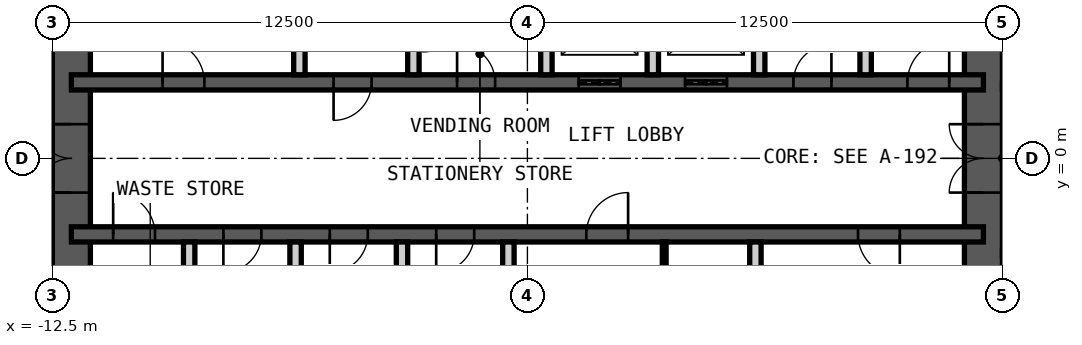
"""IFC4 building model, lengths in metres.
Left out: names, types, materials, properties, quantities, classifications, styles, units other than length and angle.
Written with IfcOpenShell. Run it as: python <this file> out.ifc"""

import sys

from ifc_helpers import new_model, si_unit, direction, frame, frame_2d, origin, place, context, subcontext, project, spatial, rectangle, extrude, element, fill, save


model = new_model("IFC4")
c1 = context("Model", 3, precision=1e-05, world=origin(), true_north=direction((0.0, 1.0)))
c2 = subcontext(c1, "Body", "Model", "MODEL_VIEW")
j1 = project(units=[si_unit("LENGTHUNIT", "METRE"), si_unit("PLANEANGLEUNIT", "RADIAN")], contexts=[c1])
p1 = place(None, origin())
s1 = spatial("IfcSite", under=j1, at=p1, CompositionType="ELEMENT")
p2 = place(p1, origin())
s2 = spatial("IfcBuilding", under=s1, at=p2, CompositionType="ELEMENT")
p3 = place(p2, frame((0.0, 0.0, 295.6)))
s3 = spatial("IfcBuildingStorey", under=s2, at=p3, CompositionType="ELEMENT", Elevation=295.6)
p4 = place(p3, frame((12.0, -9.0, 0.0), z_axis=(0.0, 0.0, 1.0), x_axis=(0.0, 1.0, 0.0)))
e1 = element("IfcWall", 1, at=p4, inside=s3, PredefinedType="SHEAR", context=c2, shape_type="SweptSolid", body=[
    extrude(rectangle(XDim=18.0, YDim=1.0, at=frame_2d((9.0, 0.0))), origin(), (0.0, 0.0, 1.0), 4.2),
])
p5 = place(p4, frame((8.1, 0.0, 0.0)))
e2 = element("IfcOpeningElement", 2, at=p5, cuts=e1, PredefinedType="OPENING", context=c2, shape_type="SweptSolid", body=[
    extrude(rectangle(XDim=1.8, YDim=2.1, at=frame_2d((0.9, 1.05))), frame((0.0, 0.51, 0.0), z_axis=(0.0, -1.0, 0.0), x_axis=(1.0, 0.0, 0.0)), (0.0, 0.0, 1.0), 1.02),
])
p6 = place(p3, frame((-12.0, -9.0, 0.0), z_axis=(0.0, 0.0, 1.0), x_axis=(0.0, 1.0, 0.0)))
e3 = element("IfcWall", 3, at=p6, inside=s3, PredefinedType="SHEAR", context=c2, shape_type="SweptSolid", body=[
    extrude(rectangle(XDim=18.0, YDim=1.0, at=frame_2d((9.0, 0.0))), origin(), (0.0, 0.0, 1.0), 4.2),
])
p7 = place(p6, frame((8.1, 0.0, 0.0)))
e4 = element("IfcOpeningElement", 4, at=p7, cuts=e3, PredefinedType="OPENING", context=c2, shape_type="SweptSolid", body=[
    extrude(rectangle(XDim=1.8, YDim=2.1, at=frame_2d((0.9, 1.05))), frame((0.0, 0.51, 0.0), z_axis=(0.0, -1.0, 0.0), x_axis=(1.0, 0.0, 0.0)), (0.0, 0.0, 1.0), 1.02),
])
p8 = place(p3, frame((-12.0, 2.0, 0.0), z_axis=(0.0, 0.0, 1.0), x_axis=(1.0, 0.0, 0.0)))
e5 = element("IfcWall", 5, at=p8, inside=s3, PredefinedType="SHEAR", context=c2, shape_type="SweptSolid", body=[
    extrude(rectangle(XDim=24.0, YDim=0.4, at=frame_2d((12.0, 0.0))), origin(), (0.0, 0.0, 1.0), 4.2),
])
p9 = place(p8, frame((2.4, 0.0, 0.0)))
e6 = element("IfcOpeningElement", 6, at=p9, cuts=e5, PredefinedType="OPENING", context=c2, shape_type="SweptSolid", body=[
    extrude(rectangle(XDim=1.1, YDim=2.1, at=frame_2d((0.55, 1.05))), frame((0.0, 0.21, 0.0), z_axis=(0.0, -1.0, 0.0), x_axis=(1.0, 0.0, 0.0)), (0.0, 0.0, 1.0), 0.42),
])
p10 = place(p8, frame((22.0, 0.0, 0.0)))
e7 = element("IfcOpeningElement", 7, at=p10, cuts=e5, PredefinedType="OPENING", context=c2, shape_type="SweptSolid", body=[
    extrude(rectangle(XDim=1.1, YDim=2.1, at=frame_2d((0.55, 1.05))), frame((0.0, 0.21, 0.0), z_axis=(0.0, -1.0, 0.0), x_axis=(1.0, 0.0, 0.0)), (0.0, 0.0, 1.0), 0.42),
])
p11 = place(p8, frame((10.15, 0.0, 0.0)))
e8 = element("IfcOpeningElement", 8, at=p11, cuts=e5, PredefinedType="OPENING", context=c2, shape_type="SweptSolid", body=[
    extrude(rectangle(XDim=1.0, YDim=2.1, at=frame_2d((0.5, 1.05))), frame((0.0, 0.21, 0.0), z_axis=(0.0, -1.0, 0.0), x_axis=(1.0, 0.0, 0.0)), (0.0, 0.0, 1.0), 0.42),
])
p12 = place(p8, frame((6.9, 0.0, 0.0)))
e9 = element("IfcOpeningElement", 9, at=p12, cuts=e5, PredefinedType="OPENING", context=c2, shape_type="SweptSolid", body=[
    extrude(rectangle(XDim=1.0, YDim=2.1, at=frame_2d((0.5, 1.05))), frame((0.0, 0.21, 0.0), z_axis=(0.0, -1.0, 0.0), x_axis=(1.0, 0.0, 0.0)), (0.0, 0.0, 1.0), 0.42),
])
p13 = place(p8, frame((13.35, 0.0, 0.0)))
e10 = element("IfcOpeningElement", 10, at=p13, cuts=e5, PredefinedType="OPENING", context=c2, shape_type="SweptSolid", body=[
    extrude(rectangle(XDim=1.1, YDim=2.4, at=frame_2d((0.55, 1.2))), frame((0.0, 0.21, 0.0), z_axis=(0.0, -1.0, 0.0), x_axis=(1.0, 0.0, 0.0)), (0.0, 0.0, 1.0), 0.42),
])
p14 = place(p8, frame((16.15, 0.0, 0.0)))
e11 = element("IfcOpeningElement", 11, at=p14, cuts=e5, PredefinedType="OPENING", context=c2, shape_type="SweptSolid", body=[
    extrude(rectangle(XDim=1.1, YDim=2.4, at=frame_2d((0.55, 1.2))), frame((0.0, 0.21, 0.0), z_axis=(0.0, -1.0, 0.0), x_axis=(1.0, 0.0, 0.0)), (0.0, 0.0, 1.0), 0.42),
])
p15 = place(p8, frame((19.0, 0.0, 0.0)))
e12 = element("IfcOpeningElement", 12, at=p15, cuts=e5, PredefinedType="OPENING", context=c2, shape_type="SweptSolid", body=[
    extrude(rectangle(XDim=1.0, YDim=2.1, at=frame_2d((0.5, 1.05))), frame((0.0, 0.21, 0.0), z_axis=(0.0, -1.0, 0.0), x_axis=(1.0, 0.0, 0.0)), (0.0, 0.0, 1.0), 0.42),
])
p16 = place(p3, frame((-12.0, -2.0, 0.0), z_axis=(0.0, 0.0, 1.0), x_axis=(1.0, 0.0, 0.0)))
e13 = element("IfcWall", 13, at=p16, inside=s3, PredefinedType="SHEAR", context=c2, shape_type="SweptSolid", body=[
    extrude(rectangle(XDim=24.0, YDim=0.4, at=frame_2d((12.0, 0.0))), origin(), (0.0, 0.0, 1.0), 4.2),
])
p17 = place(p16, frame((1.1, 0.0, 0.0)))
e14 = element("IfcOpeningElement", 14, at=p17, cuts=e13, PredefinedType="OPENING", context=c2, shape_type="SweptSolid", body=[
    extrude(rectangle(XDim=1.1, YDim=2.1, at=frame_2d((0.55, 1.05))), frame((0.0, 0.21, 0.0), z_axis=(0.0, -1.0, 0.0), x_axis=(1.0, 0.0, 0.0)), (0.0, 0.0, 1.0), 0.42),
])
p18 = place(p16, frame((13.55, 0.0, 0.0)))
e15 = element("IfcOpeningElement", 15, at=p18, cuts=e13, PredefinedType="OPENING", context=c2, shape_type="SweptSolid", body=[
    extrude(rectangle(XDim=1.1, YDim=2.1, at=frame_2d((0.55, 1.05))), frame((0.0, 0.21, 0.0), z_axis=(0.0, -1.0, 0.0), x_axis=(1.0, 0.0, 0.0)), (0.0, 0.0, 1.0), 0.42),
])
p19 = place(p16, frame((20.7, 0.0, 0.0)))
e16 = element("IfcOpeningElement", 16, at=p19, cuts=e13, PredefinedType="OPENING", context=c2, shape_type="SweptSolid", body=[
    extrude(rectangle(XDim=1.1, YDim=2.1, at=frame_2d((0.55, 1.05))), frame((0.0, 0.21, 0.0), z_axis=(0.0, -1.0, 0.0), x_axis=(1.0, 0.0, 0.0)), (0.0, 0.0, 1.0), 0.42),
])
p20 = place(p16, frame((4.0, 0.0, 0.0)))
e17 = element("IfcOpeningElement", 17, at=p20, cuts=e13, PredefinedType="OPENING", context=c2, shape_type="SweptSolid", body=[
    extrude(rectangle(XDim=1.0, YDim=2.1, at=frame_2d((0.5, 1.05))), frame((0.0, 0.21, 0.0), z_axis=(0.0, -1.0, 0.0), x_axis=(1.0, 0.0, 0.0)), (0.0, 0.0, 1.0), 0.42),
])
p21 = place(p16, frame((6.8, 0.0, 0.0)))
e18 = element("IfcOpeningElement", 18, at=p21, cuts=e13, PredefinedType="OPENING", context=c2, shape_type="SweptSolid", body=[
    extrude(rectangle(XDim=1.0, YDim=2.1, at=frame_2d((0.5, 1.05))), frame((0.0, 0.21, 0.0), z_axis=(0.0, -1.0, 0.0), x_axis=(1.0, 0.0, 0.0)), (0.0, 0.0, 1.0), 0.42),
])
p22 = place(p16, frame((9.6, 0.0, 0.0)))
e19 = element("IfcOpeningElement", 19, at=p22, cuts=e13, PredefinedType="OPENING", context=c2, shape_type="SweptSolid", body=[
    extrude(rectangle(XDim=1.0, YDim=2.1, at=frame_2d((0.5, 1.05))), frame((0.0, 0.21, 0.0), z_axis=(0.0, -1.0, 0.0), x_axis=(1.0, 0.0, 0.0)), (0.0, 0.0, 1.0), 0.42),
])
for number, where, z_axis, x_axis in (
    (20, (-6.0, 2.2, 0.0), (0.0, 0.0, 1.0), (0.0, 1.0, 0.0)),
    (21, (-3.0, 2.2, 0.0), (0.0, 0.0, 1.0), (0.0, 1.0, 0.0)),
    (22, (0.5, 2.2, 0.0), (0.0, 0.0, 1.0), (0.0, 1.0, 0.0)),
    (23, (3.3, 2.2, 0.0), (0.0, 0.0, 1.0), (0.0, 1.0, 0.0)),
    (24, (6.1, 2.2, 0.0), (0.0, 0.0, 1.0), (0.0, 1.0, 0.0)),
    (25, (8.9, 2.2, 0.0), (0.0, 0.0, 1.0), (0.0, 1.0, 0.0)),
    (26, (-8.9, -4.85, 0.0), (0.0, 0.0, 1.0), (0.0, 1.0, 0.0)),
    (27, (-6.1, -4.85, 0.0), (0.0, 0.0, 1.0), (0.0, 1.0, 0.0)),
    (28, (-3.3, -4.85, 0.0), (0.0, 0.0, 1.0), (0.0, 1.0, 0.0)),
    (29, (-0.5, -4.85, 0.0), (0.0, 0.0, 1.0), (0.0, 1.0, 0.0)),
    (30, (6.0, -4.85, 0.0), (0.0, 0.0, 1.0), (0.0, 1.0, 0.0)),
):
    element("IfcWall", number, at=place(p3, frame(where, z_axis=z_axis, x_axis=x_axis)), inside=s3, PredefinedType="PARTITIONING", context=c2, shape_type="SweptSolid", body=[
        extrude(rectangle(XDim=2.65, YDim=0.3, at=frame_2d((1.325, 0.0))), origin(), (0.0, 0.0, 1.0), 3.98),
    ])
p23 = place(p3, frame((3.6, -4.85, 0.0), z_axis=(0.0, 0.0, 1.0), x_axis=(0.0, 1.0, 0.0)))
e31 = element("IfcWall", 31, at=p23, inside=s3, PredefinedType="PARTITIONING", context=c2, shape_type="SweptSolid", body=[
    extrude(rectangle(XDim=2.65, YDim=0.1, at=frame_2d((1.325, 0.0))), origin(), (0.0, 0.0, 1.0), 3.98),
])
p24 = place(p23, frame((0.1, 0.0, 0.0)))
e32 = element("IfcOpeningElement", 32, at=p24, cuts=e31, PredefinedType="OPENING", context=c2, shape_type="SweptSolid", body=[
    extrude(rectangle(XDim=1.0, YDim=2.4, at=frame_2d((0.5, 1.2))), frame((0.0, 0.06, 0.0), z_axis=(0.0, -1.0, 0.0), x_axis=(1.0, 0.0, 0.0)), (0.0, 0.0, 1.0), 0.12),
])
p25 = place(p9, origin())
e33 = element("IfcDoor", 33, at=p25, inside=s3, OperationType="SINGLE_SWING_RIGHT", PredefinedType="DOOR", context=c2, shape_type="SweptSolid", body=[
    extrude(rectangle(XDim=1.1, YDim=2.1, at=frame_2d((0.55, 1.05))), frame((0.0, 0.025, 0.0), z_axis=(0.0, -1.0, 0.0), x_axis=(1.0, 0.0, 0.0)), (0.0, 0.0, 1.0), 0.05),
])
fill(e6, e33)
p26 = place(p17, origin())
e34 = element("IfcDoor", 34, at=p26, inside=s3, OperationType="SINGLE_SWING_RIGHT", PredefinedType="DOOR", context=c2, shape_type="SweptSolid", body=[
    extrude(rectangle(XDim=1.1, YDim=2.1, at=frame_2d((0.55, 1.05))), frame((0.0, 0.025, 0.0), z_axis=(0.0, -1.0, 0.0), x_axis=(1.0, 0.0, 0.0)), (0.0, 0.0, 1.0), 0.05),
])
fill(e14, e34)
p27 = place(p10, origin())
e35 = element("IfcDoor", 35, at=p27, inside=s3, OperationType="SINGLE_SWING_LEFT", PredefinedType="DOOR", context=c2, shape_type="SweptSolid", body=[
    extrude(rectangle(XDim=1.1, YDim=2.1, at=frame_2d((0.55, 1.05))), frame((0.0, 0.025, 0.0), z_axis=(0.0, -1.0, 0.0), x_axis=(1.0, 0.0, 0.0)), (0.0, 0.0, 1.0), 0.05),
])
fill(e7, e35)
p28 = place(p11, origin())
e36 = element("IfcDoor", 36, at=p28, inside=s3, OperationType="SINGLE_SWING_RIGHT", PredefinedType="DOOR", context=c2, shape_type="SweptSolid", body=[
    extrude(rectangle(XDim=1.0, YDim=2.1, at=frame_2d((0.5, 1.05))), frame((0.0, 0.025, 0.0), z_axis=(0.0, -1.0, 0.0), x_axis=(1.0, 0.0, 0.0)), (0.0, 0.0, 1.0), 0.05),
])
fill(e8, e36)
p29 = place(p18, origin())
e37 = element("IfcDoor", 37, at=p29, inside=s3, OperationType="SINGLE_SWING_LEFT", PredefinedType="DOOR", context=c2, shape_type="SweptSolid", body=[
    extrude(rectangle(XDim=1.1, YDim=2.1, at=frame_2d((0.55, 1.05))), frame((0.0, 0.025, 0.0), z_axis=(0.0, -1.0, 0.0), x_axis=(1.0, 0.0, 0.0)), (0.0, 0.0, 1.0), 0.05),
])
fill(e15, e37)
p30 = place(p19, origin())
e38 = element("IfcDoor", 38, at=p30, inside=s3, OperationType="SINGLE_SWING_RIGHT", PredefinedType="DOOR", context=c2, shape_type="SweptSolid", body=[
    extrude(rectangle(XDim=1.1, YDim=2.1, at=frame_2d((0.55, 1.05))), frame((0.0, 0.025, 0.0), z_axis=(0.0, -1.0, 0.0), x_axis=(1.0, 0.0, 0.0)), (0.0, 0.0, 1.0), 0.05),
])
fill(e16, e38)
p31 = place(p5, origin())
e39 = element("IfcDoor", 39, at=p31, inside=s3, OperationType="DOUBLE_DOOR_DOUBLE_SWING", PredefinedType="DOOR", context=c2, shape_type="SweptSolid", body=[
    extrude(rectangle(XDim=1.8, YDim=2.1, at=frame_2d((0.9, 1.05))), frame((0.0, 0.025, 0.0), z_axis=(0.0, -1.0, 0.0), x_axis=(1.0, 0.0, 0.0)), (0.0, 0.0, 1.0), 0.05),
])
fill(e2, e39)
p32 = place(p7, origin())
e40 = element("IfcDoor", 40, at=p32, inside=s3, OperationType="DOUBLE_DOOR_DOUBLE_SWING", PredefinedType="DOOR", context=c2, shape_type="SweptSolid", body=[
    extrude(rectangle(XDim=1.8, YDim=2.1, at=frame_2d((0.9, 1.05))), frame((0.0, 0.025, 0.0), z_axis=(0.0, -1.0, 0.0), x_axis=(1.0, 0.0, 0.0)), (0.0, 0.0, 1.0), 0.05),
])
fill(e4, e40)
p33 = place(p12, origin())
e41 = element("IfcDoor", 41, at=p33, inside=s3, OperationType="SINGLE_SWING_LEFT", PredefinedType="DOOR", context=c2, shape_type="SweptSolid", body=[
    extrude(rectangle(XDim=1.0, YDim=2.1, at=frame_2d((0.5, 1.05))), frame((0.0, 0.025, 0.0), z_axis=(0.0, -1.0, 0.0), x_axis=(1.0, 0.0, 0.0)), (0.0, 0.0, 1.0), 0.05),
])
fill(e9, e41)
p34 = place(p13, origin())
e42 = element("IfcDoor", 42, at=p34, inside=s3, OperationType="DOUBLE_DOOR_SLIDING", PredefinedType="DOOR", context=c2, shape_type="SweptSolid", body=[
    extrude(rectangle(XDim=1.1, YDim=2.4, at=frame_2d((0.55, 1.2))), frame((0.0, 0.025, 0.0), z_axis=(0.0, -1.0, 0.0), x_axis=(1.0, 0.0, 0.0)), (0.0, 0.0, 1.0), 0.05),
])
fill(e10, e42)
p35 = place(p14, origin())
e43 = element("IfcDoor", 43, at=p35, inside=s3, OperationType="DOUBLE_DOOR_SLIDING", PredefinedType="DOOR", context=c2, shape_type="SweptSolid", body=[
    extrude(rectangle(XDim=1.1, YDim=2.4, at=frame_2d((0.55, 1.2))), frame((0.0, 0.025, 0.0), z_axis=(0.0, -1.0, 0.0), x_axis=(1.0, 0.0, 0.0)), (0.0, 0.0, 1.0), 0.05),
])
fill(e11, e43)
p36 = place(p15, origin())
e44 = element("IfcDoor", 44, at=p36, inside=s3, OperationType="SINGLE_SWING_LEFT", PredefinedType="DOOR", context=c2, shape_type="SweptSolid", body=[
    extrude(rectangle(XDim=1.0, YDim=2.1, at=frame_2d((0.5, 1.05))), frame((0.0, 0.025, 0.0), z_axis=(0.0, -1.0, 0.0), x_axis=(1.0, 0.0, 0.0)), (0.0, 0.0, 1.0), 0.05),
])
fill(e12, e44)
p37 = place(p20, origin())
e45 = element("IfcDoor", 45, at=p37, inside=s3, OperationType="SINGLE_SWING_LEFT", PredefinedType="DOOR", context=c2, shape_type="SweptSolid", body=[
    extrude(rectangle(XDim=1.0, YDim=2.1, at=frame_2d((0.5, 1.05))), frame((0.0, 0.025, 0.0), z_axis=(0.0, -1.0, 0.0), x_axis=(1.0, 0.0, 0.0)), (0.0, 0.0, 1.0), 0.05),
])
fill(e17, e45)
p38 = place(p21, origin())
e46 = element("IfcDoor", 46, at=p38, inside=s3, OperationType="SINGLE_SWING_LEFT", PredefinedType="DOOR", context=c2, shape_type="SweptSolid", body=[
    extrude(rectangle(XDim=1.0, YDim=2.1, at=frame_2d((0.5, 1.05))), frame((0.0, 0.025, 0.0), z_axis=(0.0, -1.0, 0.0), x_axis=(1.0, 0.0, 0.0)), (0.0, 0.0, 1.0), 0.05),
])
fill(e18, e46)
p39 = place(p22, origin())
e47 = element("IfcDoor", 47, at=p39, inside=s3, OperationType="SINGLE_SWING_LEFT", PredefinedType="DOOR", context=c2, shape_type="SweptSolid", body=[
    extrude(rectangle(XDim=1.0, YDim=2.1, at=frame_2d((0.5, 1.05))), frame((0.0, 0.025, 0.0), z_axis=(0.0, -1.0, 0.0), x_axis=(1.0, 0.0, 0.0)), (0.0, 0.0, 1.0), 0.05),
])
fill(e19, e47)
save(model, sys.argv[1])
